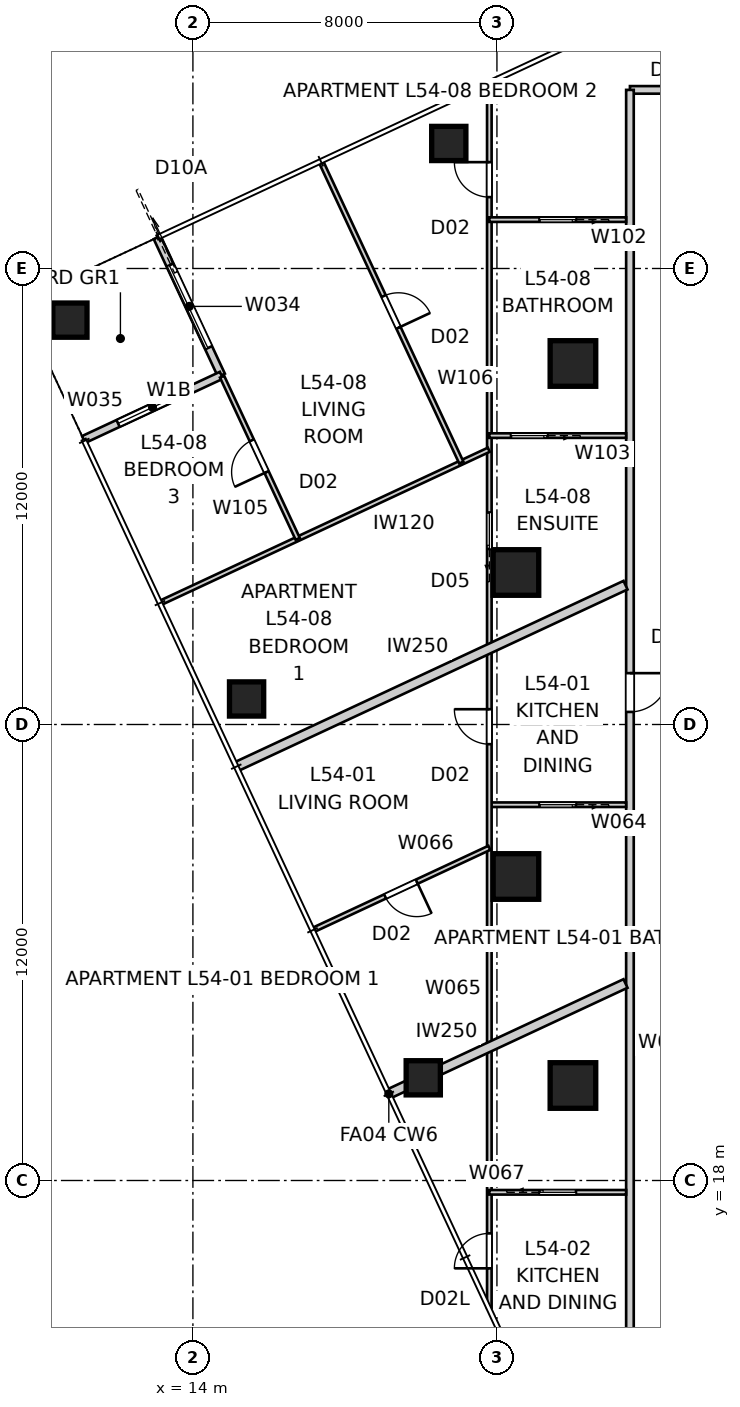
"""IFC4 building model, lengths in metres.
Left out: names, types, materials, properties, quantities, classifications, styles, units other than length and angle.
Written with IfcOpenShell. Run it as: python <this file> out.ifc"""

import sys

from ifc_helpers import new_model, si_unit, direction, frame, frame_2d, origin, origin_2d, place, context, subcontext, project, spatial, rectangle, extrude, element, fill, save


model = new_model("IFC4")
c1 = context("Model", 3, precision=1e-05, world=origin(), true_north=direction((0.0, 1.0)))
c2 = subcontext(c1, "Body", "Model", "MODEL_VIEW")
j1 = project(units=[si_unit("LENGTHUNIT", "METRE"), si_unit("PLANEANGLEUNIT", "RADIAN")], contexts=[c1])
p1 = place(None, origin())
s1 = spatial("IfcSite", under=j1, at=p1, CompositionType="ELEMENT")
p2 = place(p1, origin())
s2 = spatial("IfcBuilding", under=s1, at=p2, CompositionType="ELEMENT")
p3 = place(p2, frame((0.0, 0.0, 196.4)))
s3 = spatial("IfcBuildingStorey", under=s2, at=p3, CompositionType="ELEMENT", Elevation=196.4)
for number, where, z_axis, x_axis in (
    (1, (20.733, 45.29, 0.0), (0.0, 0.0, 1.0), (1.0, 0.0, 0.0)),
    (2, (10.764, 40.641, 0.0), (0.0, 0.0, 1.0), (1.0, 0.0, 0.0)),
    (3, (15.412, 30.672, 0.0), (0.0, 0.0, 1.0), (1.0, 0.0, 0.0)),
    (4, (20.061, 20.702, 0.0), (0.0, 0.0, 1.0), (1.0, 0.0, 0.0)),
):
    element("IfcColumn", number, at=place(p3, frame(where, z_axis=z_axis, x_axis=x_axis)), inside=s3, PredefinedType="COLUMN", context=c2, shape_type="SweptSolid", body=[
        extrude(rectangle(XDim=0.9, YDim=0.9, at=origin_2d()), origin(), (0.0, 0.0, 1.0), 3.4),
    ])
for number, where, z_axis, x_axis in (
    (5, (24.0, 39.5, 0.0), (0.0, 0.0, 1.0), (1.0, 0.0, 0.0)),
    (6, (22.5, 34.0, 0.0), (0.0, 0.0, 1.0), (1.0, 0.0, 0.0)),
    (7, (22.5, 26.0, 0.0), (0.0, 0.0, 1.0), (1.0, 0.0, 0.0)),
    (8, (24.0, 20.5, 0.0), (0.0, 0.0, 1.0), (1.0, 0.0, 0.0)),
):
    element("IfcColumn", number, at=place(p3, frame(where, z_axis=z_axis, x_axis=x_axis)), inside=s3, PredefinedType="COLUMN", context=c2, shape_type="SweptSolid", body=[
        extrude(rectangle(XDim=1.2, YDim=1.2, at=origin_2d()), origin(), (0.0, 0.0, 1.0), 3.4),
    ])
p4 = place(p3, frame((13.06, 42.815, 0.0), z_axis=(0.0, 0.0, 1.0), x_axis=(0.422658246362, -0.906289140828, 0.0)))
e9 = element("IfcWall", 9, at=p4, inside=s3, PredefinedType="SOLIDWALL", context=c2, shape_type="SweptSolid", body=[
    extrude(rectangle(XDim=4.0, YDim=0.2, at=frame_2d((2.0, 0.0))), origin(), (0.0, 0.0, 1.0), 3.25),
])
p5 = place(p4, frame((0.8, 0.0, 0.0)))
e10 = element("IfcOpeningElement", 10, at=p5, cuts=e9, PredefinedType="OPENING", context=c2, shape_type="SweptSolid", body=[
    extrude(rectangle(XDim=2.4, YDim=2.1, at=frame_2d((1.2, 1.05))), frame((0.0, 0.11, 0.0), z_axis=(0.0, -1.0, 0.0), x_axis=(1.0, 0.0, 0.0)), (0.0, 0.0, 1.0), 0.22),
])
p6 = place(p3, frame((14.75, 39.19, 0.0), z_axis=(0.0, 0.0, 1.0), x_axis=(-0.906289140828, -0.422658246362, 0.0)))
e11 = element("IfcWall", 11, at=p6, inside=s3, PredefinedType="SOLIDWALL", context=c2, shape_type="SweptSolid", body=[
    extrude(rectangle(XDim=4.0, YDim=0.2, at=frame_2d((2.0, 0.0))), origin(), (0.0, 0.0, 1.0), 3.25),
])
p7 = place(p6, frame((1.0, 0.0, 0.45)))
e12 = element("IfcOpeningElement", 12, at=p7, cuts=e11, PredefinedType="OPENING", context=c2, shape_type="SweptSolid", body=[
    extrude(rectangle(XDim=2.0, YDim=1.8, at=frame_2d((1.0, 0.9))), frame((0.0, 0.11, 0.0), z_axis=(0.0, -1.0, 0.0), x_axis=(1.0, 0.0, 0.0)), (0.0, 0.0, 1.0), 0.22),
])
p8 = place(p3, frame((32.225, 46.7, 0.0), z_axis=(0.0, 0.0, 1.0), x_axis=(-1.0, 0.0, 0.0)))
e13 = element("IfcWall", 13, at=p8, inside=s3, PredefinedType="PARTITIONING", context=c2, shape_type="SweptSolid", body=[
    extrude(rectangle(XDim=6.725, YDim=0.2, at=frame_2d((3.362, 0.0))), origin(), (0.0, 0.0, 1.0), 3.25),
])
p9 = place(p8, frame((2.647, 0.0, 0.0)))
e14 = element("IfcOpeningElement", 14, at=p9, cuts=e13, PredefinedType="OPENING", context=c2, shape_type="SweptSolid", body=[
    extrude(rectangle(XDim=1.02, YDim=2.34, at=frame_2d((0.51, 1.17))), frame((0.0, 0.11, 0.0), z_axis=(0.0, -1.0, 0.0), x_axis=(1.0, 0.0, 0.0)), (0.0, 0.0, 1.0), 0.22),
])
p10 = place(p3, frame((25.5, 46.7, 0.0), z_axis=(0.0, 0.0, 1.0), x_axis=(0.0, -1.0, 0.0)))
e15 = element("IfcWall", 15, at=p10, inside=s3, PredefinedType="PARTITIONING", context=c2, shape_type="SweptSolid", body=[
    extrude(rectangle(XDim=33.8, YDim=0.2, at=frame_2d((16.9, 0.0))), origin(), (0.0, 0.0, 1.0), 3.25),
])
p11 = place(p10, frame((15.349, 0.0, 0.0)))
e16 = element("IfcOpeningElement", 16, at=p11, cuts=e15, PredefinedType="OPENING", context=c2, shape_type="SweptSolid", body=[
    extrude(rectangle(XDim=1.02, YDim=2.34, at=frame_2d((0.51, 1.17))), frame((0.0, 0.11, 0.0), z_axis=(0.0, -1.0, 0.0), x_axis=(1.0, 0.0, 0.0)), (0.0, 0.0, 1.0), 0.22),
])
p12 = place(p3, frame((19.155, 20.28, 0.0), z_axis=(0.0, 0.0, 1.0), x_axis=(0.90631378723, 0.422605394046, 0.0)))
e17 = element("IfcWall", 17, at=p12, inside=s3, PredefinedType="PARTITIONING", context=c2, shape_type="SweptSolid", body=[
    extrude(rectangle(XDim=6.872, YDim=0.25, at=frame_2d((3.436, 0.0))), origin(), (0.0, 0.0, 1.0), 3.25),
])
p13 = place(p3, frame((15.14, 28.89, 0.0), z_axis=(0.0, 0.0, 1.0), x_axis=(0.906306714884, 0.422620560972, 0.0)))
e18 = element("IfcWall", 18, at=p13, inside=s3, PredefinedType="PARTITIONING", context=c2, shape_type="SweptSolid", body=[
    extrude(rectangle(XDim=11.302, YDim=0.25, at=frame_2d((5.651, 0.0))), origin(), (0.0, 0.0, 1.0), 3.25),
])
p14 = place(p3, frame((25.4, 27.889, 0.0), z_axis=(0.0, 0.0, 1.0), x_axis=(-1.0, 0.0, 0.0)))
e19 = element("IfcWall", 19, at=p14, inside=s3, PredefinedType="PARTITIONING", context=c2, shape_type="SweptSolid", body=[
    extrude(rectangle(XDim=3.6, YDim=0.12, at=frame_2d((1.8, 0.0))), origin(), (0.0, 0.0, 1.0), 3.25),
])
p15 = place(p14, frame((1.32, 0.0, 0.0)))
e20 = element("IfcOpeningElement", 20, at=p15, cuts=e19, PredefinedType="OPENING", context=c2, shape_type="SweptSolid", body=[
    extrude(rectangle(XDim=0.96, YDim=2.1, at=frame_2d((0.48, 1.05))), frame((0.0, 0.07, 0.0), z_axis=(0.0, -1.0, 0.0), x_axis=(1.0, 0.0, 0.0)), (0.0, 0.0, 1.0), 0.14),
])
p16 = place(p3, frame((21.8, 14.647, 0.0), z_axis=(0.0, 0.0, 1.0), x_axis=(0.0, 1.0, 0.0)))
e21 = element("IfcWall", 21, at=p16, inside=s3, PredefinedType="PARTITIONING", context=c2, shape_type="SweptSolid", body=[
    extrude(rectangle(XDim=32.199, YDim=0.12, at=frame_2d((16.1, 0.0))), origin(), (0.0, 0.0, 1.0), 3.25),
])
p17 = place(p16, frame((29.231, 0.0, 0.0)))
e22 = element("IfcOpeningElement", 22, at=p17, cuts=e21, PredefinedType="OPENING", context=c2, shape_type="SweptSolid", body=[
    extrude(rectangle(XDim=0.92, YDim=2.34, at=frame_2d((0.46, 1.17))), frame((0.0, 0.07, 0.0), z_axis=(0.0, -1.0, 0.0), x_axis=(1.0, 0.0, 0.0)), (0.0, 0.0, 1.0), 0.14),
])
p18 = place(p16, frame((14.835, 0.0, 0.0)))
e23 = element("IfcOpeningElement", 23, at=p18, cuts=e21, PredefinedType="OPENING", context=c2, shape_type="SweptSolid", body=[
    extrude(rectangle(XDim=0.92, YDim=2.34, at=frame_2d((0.46, 1.17))), frame((0.0, 0.07, 0.0), z_axis=(0.0, -1.0, 0.0), x_axis=(1.0, 0.0, 0.0)), (0.0, 0.0, 1.0), 0.14),
])
p19 = place(p16, frame((1.041, 0.0, 0.0)))
e24 = element("IfcOpeningElement", 24, at=p19, cuts=e21, PredefinedType="OPENING", context=c2, shape_type="SweptSolid", body=[
    extrude(rectangle(XDim=0.92, YDim=2.1, at=frame_2d((0.46, 1.05))), frame((0.0, 0.07, 0.0), z_axis=(0.0, -1.0, 0.0), x_axis=(1.0, 0.0, 0.0)), (0.0, 0.0, 1.0), 0.14),
])
p20 = place(p16, frame((19.971, 0.0, 0.0)))
e25 = element("IfcOpeningElement", 25, at=p20, cuts=e21, PredefinedType="OPENING", context=c2, shape_type="SweptSolid", body=[
    extrude(rectangle(XDim=0.96, YDim=2.1, at=frame_2d((0.48, 1.05))), frame((0.0, 0.07, 0.0), z_axis=(0.0, -1.0, 0.0), x_axis=(1.0, 0.0, 0.0)), (0.0, 0.0, 1.0), 0.14),
])
p21 = place(p3, frame((21.8, 26.754, 0.0), z_axis=(0.0, 0.0, 1.0), x_axis=(-0.906306780958, -0.422620419278, 0.0)))
e26 = element("IfcWall", 26, at=p21, inside=s3, PredefinedType="PARTITIONING", context=c2, shape_type="SweptSolid", body=[
    extrude(rectangle(XDim=5.094, YDim=0.12, at=frame_2d((2.547, 0.0))), origin(), (0.0, 0.0, 1.0), 3.25),
])
p22 = place(p21, frame((2.107, 0.0, 0.0)))
e27 = element("IfcOpeningElement", 27, at=p22, cuts=e26, PredefinedType="OPENING", context=c2, shape_type="SweptSolid", body=[
    extrude(rectangle(XDim=0.92, YDim=2.34, at=frame_2d((0.46, 1.17))), frame((0.0, 0.07, 0.0), z_axis=(0.0, -1.0, 0.0), x_axis=(1.0, 0.0, 0.0)), (0.0, 0.0, 1.0), 0.14),
])
p23 = place(p3, frame((21.8, 17.69, 0.0), z_axis=(0.0, 0.0, 1.0), x_axis=(1.0, 0.0, 0.0)))
e28 = element("IfcWall", 28, at=p23, inside=s3, PredefinedType="PARTITIONING", context=c2, shape_type="SweptSolid", body=[
    extrude(rectangle(XDim=3.6, YDim=0.12, at=frame_2d((1.8, 0.0))), origin(), (0.0, 0.0, 1.0), 3.25),
])
p24 = place(p23, frame((1.32, 0.0, 0.0)))
e29 = element("IfcOpeningElement", 29, at=p24, cuts=e28, PredefinedType="OPENING", context=c2, shape_type="SweptSolid", body=[
    extrude(rectangle(XDim=0.96, YDim=2.1, at=frame_2d((0.48, 1.05))), frame((0.0, 0.07, 0.0), z_axis=(0.0, -1.0, 0.0), x_axis=(1.0, 0.0, 0.0)), (0.0, 0.0, 1.0), 0.14),
])
p25 = place(p3, frame((25.4, 43.286, 0.0), z_axis=(0.0, 0.0, 1.0), x_axis=(-1.0, 0.0, 0.0)))
e30 = element("IfcWall", 30, at=p25, inside=s3, PredefinedType="PARTITIONING", context=c2, shape_type="SweptSolid", body=[
    extrude(rectangle(XDim=3.6, YDim=0.12, at=frame_2d((1.8, 0.0))), origin(), (0.0, 0.0, 1.0), 3.25),
])
p26 = place(p25, frame((1.32, 0.0, 0.0)))
e31 = element("IfcOpeningElement", 31, at=p26, cuts=e30, PredefinedType="OPENING", context=c2, shape_type="SweptSolid", body=[
    extrude(rectangle(XDim=0.96, YDim=2.1, at=frame_2d((0.48, 1.05))), frame((0.0, 0.07, 0.0), z_axis=(0.0, -1.0, 0.0), x_axis=(1.0, 0.0, 0.0)), (0.0, 0.0, 1.0), 0.14),
])
p27 = place(p3, frame((25.4, 37.602, 0.0), z_axis=(0.0, 0.0, 1.0), x_axis=(-1.0, 0.0, 0.0)))
e32 = element("IfcWall", 32, at=p27, inside=s3, PredefinedType="PARTITIONING", context=c2, shape_type="SweptSolid", body=[
    extrude(rectangle(XDim=3.6, YDim=0.12, at=frame_2d((1.8, 0.0))), origin(), (0.0, 0.0, 1.0), 3.25),
])
p28 = place(p27, frame((2.07, 0.0, 0.0)))
e33 = element("IfcOpeningElement", 33, at=p28, cuts=e32, PredefinedType="OPENING", context=c2, shape_type="SweptSolid", body=[
    extrude(rectangle(XDim=0.96, YDim=2.1, at=frame_2d((0.48, 1.05))), frame((0.0, 0.07, 0.0), z_axis=(0.0, -1.0, 0.0), x_axis=(1.0, 0.0, 0.0)), (0.0, 0.0, 1.0), 0.14),
])
p29 = place(p3, frame((21.785, 37.229, 0.0), z_axis=(0.0, 0.0, 1.0), x_axis=(-0.906297260976, -0.422640834216, 0.0)))
e34 = element("IfcWall", 34, at=p29, inside=s3, PredefinedType="PARTITIONING", context=c2, shape_type="SweptSolid", body=[
    extrude(rectangle(XDim=9.507, YDim=0.12, at=frame_2d((4.753, 0.0))), origin(), (0.0, 0.0, 1.0), 3.25),
])
p30 = place(p3, frame((16.758, 34.885, 0.0), z_axis=(0.0, 0.0, 1.0), x_axis=(-0.422601682441, 0.906315517906, 0.0)))
e35 = element("IfcWall", 35, at=p30, inside=s3, PredefinedType="PARTITIONING", context=c2, shape_type="SweptSolid", body=[
    extrude(rectangle(XDim=4.71, YDim=0.12, at=frame_2d((2.355, 0.0))), origin(), (0.0, 0.0, 1.0), 3.25),
])
p31 = place(p30, frame((1.94, 0.0, 0.0)))
e36 = element("IfcOpeningElement", 36, at=p31, cuts=e35, PredefinedType="OPENING", context=c2, shape_type="SweptSolid", body=[
    extrude(rectangle(XDim=0.92, YDim=2.34, at=frame_2d((0.46, 1.17))), frame((0.0, 0.07, 0.0), z_axis=(0.0, -1.0, 0.0), x_axis=(1.0, 0.0, 0.0)), (0.0, 0.0, 1.0), 0.14),
])
p32 = place(p3, frame((17.382, 44.787, 0.0), z_axis=(0.0, 0.0, 1.0), x_axis=(0.422604635972, -0.906314140712, 0.0)))
e37 = element("IfcWall", 37, at=p32, inside=s3, PredefinedType="PARTITIONING", context=c2, shape_type="SweptSolid", body=[
    extrude(rectangle(XDim=8.71, YDim=0.12, at=frame_2d((4.355, 0.0))), origin(), (0.0, 0.0, 1.0), 3.25),
])
p33 = place(p32, frame((3.875, 0.0, 0.0)))
e38 = element("IfcOpeningElement", 38, at=p33, cuts=e37, PredefinedType="OPENING", context=c2, shape_type="SweptSolid", body=[
    extrude(rectangle(XDim=0.92, YDim=2.34, at=frame_2d((0.46, 1.17))), frame((0.0, 0.07, 0.0), z_axis=(0.0, -1.0, 0.0), x_axis=(1.0, 0.0, 0.0)), (0.0, 0.0, 1.0), 0.14),
])
p34 = place(p5, origin())
e39 = element("IfcDoor", 39, at=p34, inside=s3, OperationType="SLIDING_TO_LEFT", PredefinedType="DOOR", context=c2, shape_type="SweptSolid", body=[
    extrude(rectangle(XDim=2.4, YDim=2.1, at=frame_2d((1.2, 1.05))), frame((0.0, 0.025, 0.0), z_axis=(0.0, -1.0, 0.0), x_axis=(1.0, 0.0, 0.0)), (0.0, 0.0, 1.0), 0.05),
])
fill(e10, e39)
p35 = place(p7, origin())
e40 = element("IfcWindow", 40, at=p35, inside=s3, PartitioningType="SINGLE_PANEL", PredefinedType="WINDOW", context=c2, shape_type="SweptSolid", body=[
    extrude(rectangle(XDim=2.0, YDim=1.8, at=frame_2d((1.0, 0.9))), frame((0.0, 0.03, 0.0), z_axis=(0.0, -1.0, 0.0), x_axis=(1.0, 0.0, 0.0)), (0.0, 0.0, 1.0), 0.06),
])
fill(e12, e40)
p36 = place(p11, origin())
e41 = element("IfcDoor", 41, at=p36, inside=s3, OperationType="SINGLE_SWING_LEFT", PredefinedType="DOOR", context=c2, shape_type="SweptSolid", body=[
    extrude(rectangle(XDim=1.02, YDim=2.34, at=frame_2d((0.51, 1.17))), frame((0.0, 0.025, 0.0), z_axis=(0.0, -1.0, 0.0), x_axis=(1.0, 0.0, 0.0)), (0.0, 0.0, 1.0), 0.05),
])
fill(e16, e41)
p37 = place(p17, origin())
e42 = element("IfcDoor", 42, at=p37, inside=s3, OperationType="SINGLE_SWING_RIGHT", PredefinedType="DOOR", context=c2, shape_type="SweptSolid", body=[
    extrude(rectangle(XDim=0.92, YDim=2.34, at=frame_2d((0.46, 1.17))), frame((0.0, 0.025, 0.0), z_axis=(0.0, -1.0, 0.0), x_axis=(1.0, 0.0, 0.0)), (0.0, 0.0, 1.0), 0.05),
])
fill(e22, e42)
p38 = place(p26, origin())
e43 = element("IfcDoor", 43, at=p38, inside=s3, OperationType="SLIDING_TO_LEFT", PredefinedType="DOOR", context=c2, shape_type="SweptSolid", body=[
    extrude(rectangle(XDim=0.96, YDim=2.1, at=frame_2d((0.48, 1.05))), frame((0.0, 0.025, 0.0), z_axis=(0.0, -1.0, 0.0), x_axis=(1.0, 0.0, 0.0)), (0.0, 0.0, 1.0), 0.05),
])
fill(e31, e43)
p39 = place(p18, origin())
e44 = element("IfcDoor", 44, at=p39, inside=s3, OperationType="SINGLE_SWING_RIGHT", PredefinedType="DOOR", context=c2, shape_type="SweptSolid", body=[
    extrude(rectangle(XDim=0.92, YDim=2.34, at=frame_2d((0.46, 1.17))), frame((0.0, 0.025, 0.0), z_axis=(0.0, -1.0, 0.0), x_axis=(1.0, 0.0, 0.0)), (0.0, 0.0, 1.0), 0.05),
])
fill(e23, e44)
p40 = place(p15, origin())
e45 = element("IfcDoor", 45, at=p40, inside=s3, OperationType="SLIDING_TO_LEFT", PredefinedType="DOOR", context=c2, shape_type="SweptSolid", body=[
    extrude(rectangle(XDim=0.96, YDim=2.1, at=frame_2d((0.48, 1.05))), frame((0.0, 0.025, 0.0), z_axis=(0.0, -1.0, 0.0), x_axis=(1.0, 0.0, 0.0)), (0.0, 0.0, 1.0), 0.05),
])
fill(e20, e45)
p41 = place(p24, origin())
e46 = element("IfcDoor", 46, at=p41, inside=s3, OperationType="SLIDING_TO_LEFT", PredefinedType="DOOR", context=c2, shape_type="SweptSolid", body=[
    extrude(rectangle(XDim=0.96, YDim=2.1, at=frame_2d((0.48, 1.05))), frame((0.0, 0.025, 0.0), z_axis=(0.0, -1.0, 0.0), x_axis=(1.0, 0.0, 0.0)), (0.0, 0.0, 1.0), 0.05),
])
fill(e29, e46)
p42 = place(p19, origin())
e47 = element("IfcDoor", 47, at=p42, inside=s3, OperationType="SINGLE_SWING_LEFT", PredefinedType="DOOR", context=c2, shape_type="SweptSolid", body=[
    extrude(rectangle(XDim=0.92, YDim=2.1, at=frame_2d((0.46, 1.05))), frame((0.0, 0.025, 0.0), z_axis=(0.0, -1.0, 0.0), x_axis=(1.0, 0.0, 0.0)), (0.0, 0.0, 1.0), 0.05),
])
fill(e24, e47)
p43 = place(p28, origin())
e48 = element("IfcDoor", 48, at=p43, inside=s3, OperationType="SLIDING_TO_LEFT", PredefinedType="DOOR", context=c2, shape_type="SweptSolid", body=[
    extrude(rectangle(XDim=0.96, YDim=2.1, at=frame_2d((0.48, 1.05))), frame((0.0, 0.025, 0.0), z_axis=(0.0, -1.0, 0.0), x_axis=(1.0, 0.0, 0.0)), (0.0, 0.0, 1.0), 0.05),
])
fill(e33, e48)
p44 = place(p22, origin())
e49 = element("IfcDoor", 49, at=p44, inside=s3, OperationType="SINGLE_SWING_LEFT", PredefinedType="DOOR", context=c2, shape_type="SweptSolid", body=[
    extrude(rectangle(XDim=0.92, YDim=2.34, at=frame_2d((0.46, 1.17))), frame((0.0, 0.025, 0.0), z_axis=(0.0, -1.0, 0.0), x_axis=(1.0, 0.0, 0.0)), (0.0, 0.0, 1.0), 0.05),
])
fill(e27, e49)
p45 = place(p20, origin())
e50 = element("IfcDoor", 50, at=p45, inside=s3, OperationType="SLIDING_TO_LEFT", PredefinedType="DOOR", context=c2, shape_type="SweptSolid", body=[
    extrude(rectangle(XDim=0.96, YDim=2.1, at=frame_2d((0.48, 1.05))), frame((0.0, 0.025, 0.0), z_axis=(0.0, -1.0, 0.0), x_axis=(1.0, 0.0, 0.0)), (0.0, 0.0, 1.0), 0.05),
])
fill(e25, e50)
p46 = place(p33, origin())
e51 = element("IfcDoor", 51, at=p46, inside=s3, OperationType="SINGLE_SWING_RIGHT", PredefinedType="DOOR", context=c2, shape_type="SweptSolid", body=[
    extrude(rectangle(XDim=0.92, YDim=2.34, at=frame_2d((0.46, 1.17))), frame((0.0, 0.025, 0.0), z_axis=(0.0, -1.0, 0.0), x_axis=(1.0, 0.0, 0.0)), (0.0, 0.0, 1.0), 0.05),
])
fill(e38, e51)
p47 = place(p31, origin())
e52 = element("IfcDoor", 52, at=p47, inside=s3, OperationType="SINGLE_SWING_LEFT", PredefinedType="DOOR", context=c2, shape_type="SweptSolid", body=[
    extrude(rectangle(XDim=0.92, YDim=2.34, at=frame_2d((0.46, 1.17))), frame((0.0, 0.025, 0.0), z_axis=(0.0, -1.0, 0.0), x_axis=(1.0, 0.0, 0.0)), (0.0, 0.0, 1.0), 0.05),
])
fill(e36, e52)
save(model, sys.argv[1])
